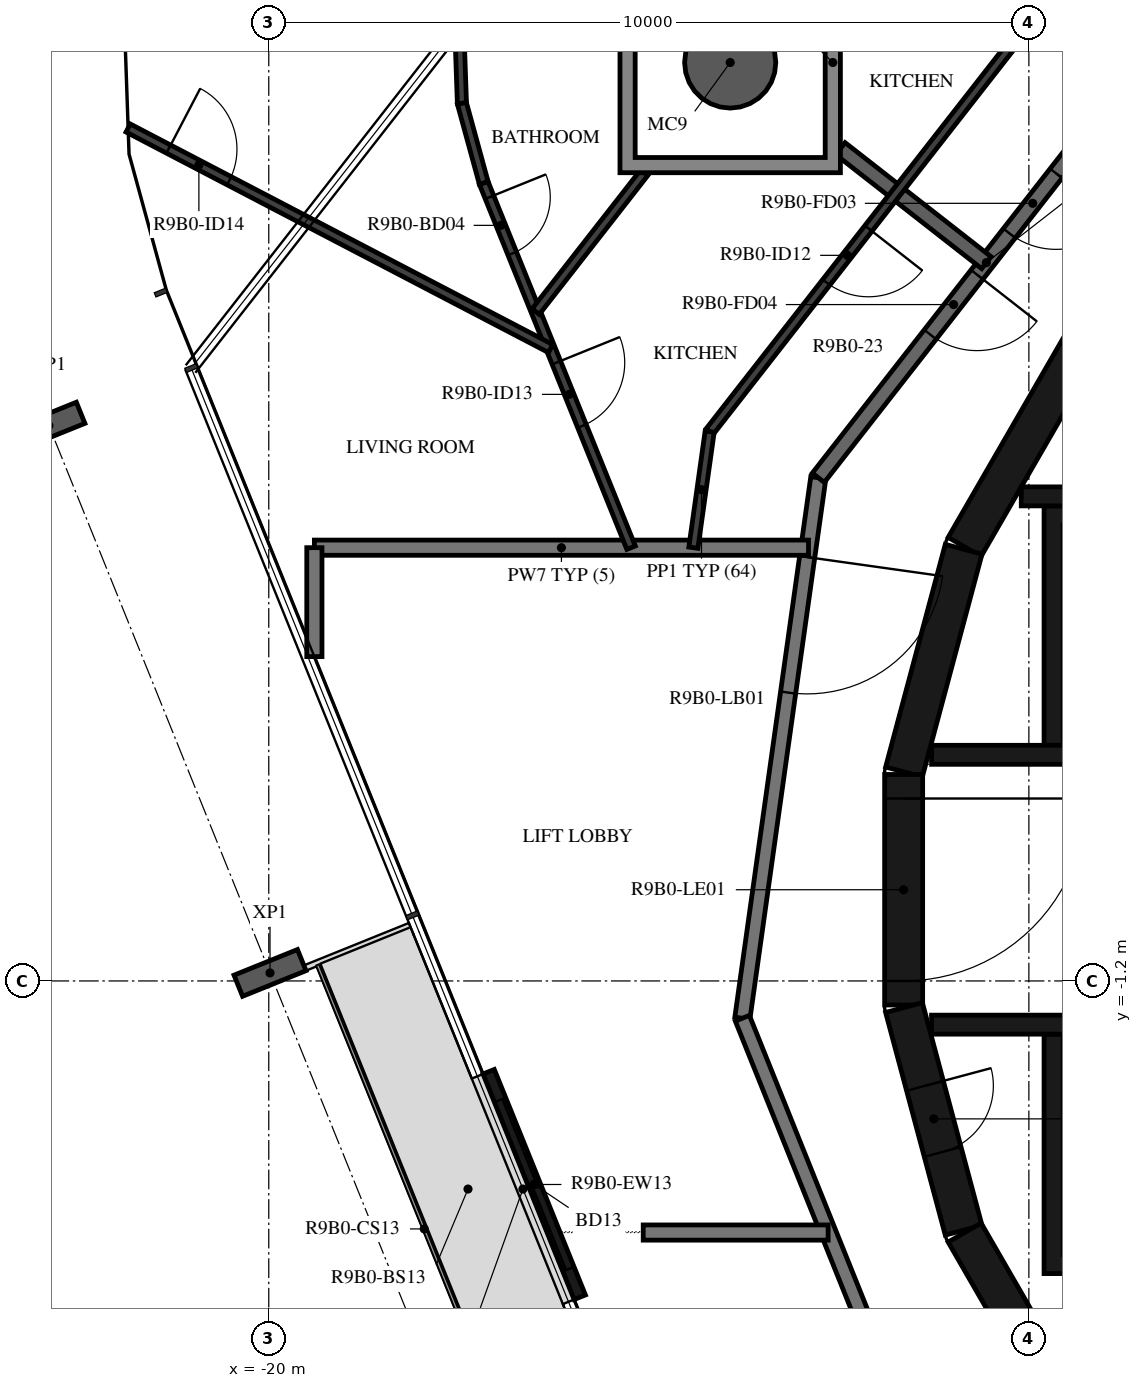
"""IFC4 building model, lengths in metres.
Left out: names, types, materials, properties, quantities, classifications, styles, units other than length and angle.
Written with IfcOpenShell. Run it as: python <this file> out.ifc"""

import sys

from ifc_helpers import new_model, si_unit, direction, frame, frame_2d, origin, origin_2d, place, context, subcontext, project, spatial, polyline, rectangle, hollow_circle, i_section, outline, extrude, element, fill, save


model = new_model("IFC4")
c1 = context("Model", 3, precision=1e-05, world=origin(), true_north=direction((0.0, 1.0)))
c2 = subcontext(c1, "Body", "Model", "MODEL_VIEW")
j1 = project(units=[si_unit("LENGTHUNIT", "METRE"), si_unit("PLANEANGLEUNIT", "RADIAN")], contexts=[c1])
p1 = place(None, origin())
s1 = spatial("IfcSite", under=j1, at=p1, CompositionType="ELEMENT")
p2 = place(p1, origin())
s2 = spatial("IfcBuilding", under=s1, at=p2, CompositionType="ELEMENT")
p3 = place(p2, frame((0.0, 0.0, 347.0)))
s3 = spatial("IfcBuildingStorey", under=s2, at=p3, CompositionType="ELEMENT", Elevation=347.0)
p4 = place(p3, frame((-13.929, 10.883, -0.38), z_axis=(0.0, 0.0, 1.0), x_axis=(1.0, 0.0, 0.0)))
e1 = element("IfcColumn", 1, at=p4, inside=s3, PredefinedType="COLUMN", context=c2, shape_type="SweptSolid", body=[
    extrude(hollow_circle(Radius=0.6, WallThickness=0.03, at=origin_2d()), origin(), (0.0, 0.0, 1.0), 3.5),
])
for number, where, z_axis, x_axis in (
    (2, (-22.893, 6.106, -0.38), (0.0, 0.0, 1.0), (-0.375, 0.927, 0.0)),
    (3, (-19.984, -1.094, -0.38), (0.0, 0.0, 1.0), (-0.375, 0.927, 0.0)),
):
    element("IfcColumn", number, at=place(p3, frame(where, z_axis=z_axis, x_axis=x_axis)), inside=s3, PredefinedType="COLUMN", context=c2, shape_type="SweptSolid", body=[
        extrude(i_section(OverallWidth=0.3, OverallDepth=0.9, WebThickness=0.019, FlangeThickness=0.035, FilletRadius=0.03, at=origin_2d()), origin(), (0.0, 0.0, 1.0), 3.5),
    ])
p5 = place(p3, frame((-17.107, -2.394, 0.0), z_axis=(0.0, 0.0, 1.0), x_axis=(0.374598019739, -0.927187318511, 0.0)))
e4 = element("IfcWall", 4, at=p5, inside=s3, PredefinedType="STANDARD", context=c2, shape_type="SweptSolid", body=[
    extrude(rectangle(XDim=3.2, YDim=0.16, at=frame_2d((1.6, 0.0))), origin(), (0.0, 0.0, 1.0), 3.12),
])
p6 = place(p5, frame((0.4, 0.0, 0.0)))
e5 = element("IfcOpeningElement", 5, at=p6, cuts=e4, PredefinedType="OPENING", context=c2, shape_type="SweptSolid", body=[
    extrude(rectangle(XDim=2.4, YDim=2.4, at=frame_2d((1.2, 1.2))), frame((0.0, 0.09, 0.0), z_axis=(0.0, -1.0, 0.0), x_axis=(1.0, 0.0, 0.0)), (0.0, 0.0, 1.0), 0.18),
])
for number, where, z_axis, x_axis in (
    (6, (-9.329, 7.137, 0.0), (0.0, 0.0, 1.0), (-0.5, -0.866, 0.0)),
    (7, (-10.858, 4.479, 0.0), (0.0, 0.0, 1.0), (-0.259, -0.966, 0.0)),
):
    element("IfcWall", number, at=place(p3, frame(where, z_axis=z_axis, x_axis=x_axis)), inside=s3, PredefinedType="SHEAR", context=c2, shape_type="SweptSolid", body=[
        extrude(rectangle(XDim=3.033, YDim=0.5, at=frame_2d((1.516, 0.0))), origin(), (0.0, 0.0, 1.0), 3.12),
    ])
p7 = place(p3, frame((-11.647, 1.516, 0.0), z_axis=(0.0, 0.0, 1.0), x_axis=(0.0, -1.0, 0.0)))
e8 = element("IfcWall", 8, at=p7, inside=s3, PredefinedType="SHEAR", context=c2, shape_type="SweptSolid", body=[
    extrude(rectangle(XDim=3.033, YDim=0.5, at=frame_2d((1.516, 0.0))), origin(), (0.0, 0.0, 1.0), 3.12),
])
p8 = place(p7, frame((0.316, 0.0, 0.0)))
e9 = element("IfcOpeningElement", 9, at=p8, cuts=e8, PredefinedType="OPENING", context=c2, shape_type="SweptSolid", body=[
    extrude(rectangle(XDim=2.4, YDim=2.1, at=frame_2d((1.2, 1.05))), frame((0.0, 0.26, 0.0), z_axis=(0.0, -1.0, 0.0), x_axis=(1.0, 0.0, 0.0)), (0.0, 0.0, 1.0), 0.52),
])
p9 = place(p3, frame((-11.643, -1.55, 0.0), z_axis=(0.0, 0.0, 1.0), x_axis=(0.258734743916, -0.965948410781, 0.0)))
e10 = element("IfcWall", 10, at=p9, inside=s3, PredefinedType="SHEAR", context=c2, shape_type="SweptSolid", body=[
    extrude(rectangle(XDim=3.033, YDim=0.5, at=frame_2d((1.516, 0.0))), origin(), (0.0, 0.0, 1.0), 3.12),
])
p10 = place(p9, frame((1.066, 0.0, 0.0)))
e11 = element("IfcOpeningElement", 11, at=p10, cuts=e10, PredefinedType="OPENING", context=c2, shape_type="SweptSolid", body=[
    extrude(rectangle(XDim=0.9, YDim=2.1, at=frame_2d((0.45, 1.05))), frame((0.0, 0.26, 0.0), z_axis=(0.0, -1.0, 0.0), x_axis=(1.0, 0.0, 0.0)), (0.0, 0.0, 1.0), 0.52),
])
p11 = place(p3, frame((-10.845, -4.51, 0.0), z_axis=(0.0, 0.0, 1.0), x_axis=(0.500087131594, -0.865975092491, 0.0)))
e12 = element("IfcWall", 12, at=p11, inside=s3, PredefinedType="SHEAR", context=c2, shape_type="SweptSolid", body=[
    extrude(rectangle(XDim=3.033, YDim=0.5, at=frame_2d((1.516, 0.0))), origin(), (0.0, 0.0, 1.0), 3.12),
])
p12 = place(p3, frame((-7.0, 5.175, 0.0), z_axis=(0.0, 0.0, 1.0), x_axis=(-1.0, 0.0, 0.0)))
e13 = element("IfcWall", 13, at=p12, inside=s3, PredefinedType="SHEAR", context=c2, shape_type="SweptSolid", body=[
    extrude(rectangle(XDim=3.1, YDim=0.25, at=frame_2d((1.55, 0.0))), origin(), (0.0, 0.0, 1.0), 3.12),
])
p13 = place(p3, origin())
e14 = element("IfcWall", 14, at=p13, inside=s3, PredefinedType="SHEAR", context=c2, shape_type="SweptSolid", body=[
    extrude(outline(polyline([(-9.8, 1.9), (-9.55, 1.9), (-9.55, 4.8), (-1.2, 4.8), (-1.2, 1.9), (-0.95, 1.9), (-0.95, 4.8), (3.1, 4.8), (3.1, 1.9), (3.35, 1.9), (3.35, 4.8), (5.25, 4.8), (5.25, 1.9), (5.5, 1.9), (5.5, 4.8), (7.4, 4.8), (7.4, 1.9), (7.65, 1.9), (7.65, 4.8), (9.55, 4.8), (9.55, 1.9), (9.8, 1.9), (9.8, 4.8), (9.8, 5.05), (-9.8, 5.05), (-9.8, 4.8), (-9.8, 1.9)])), origin(), (0.0, 0.0, 1.0), 3.12),
])
p14 = place(p3, origin())
e15 = element("IfcWall", 15, at=p14, inside=s3, PredefinedType="SHEAR", context=c2, shape_type="SweptSolid", body=[
    extrude(outline(polyline([(9.8, -5.05), (9.8, -4.8), (9.8, -1.9), (9.55, -1.9), (9.55, -4.8), (7.65, -4.8), (7.65, -1.9), (7.4, -1.9), (7.4, -4.8), (5.5, -4.8), (5.5, -1.9), (5.25, -1.9), (5.25, -4.8), (3.35, -4.8), (3.35, -1.9), (3.1, -1.9), (3.1, -4.8), (1.2, -4.8), (1.2, -1.9), (0.95, -1.9), (0.95, -4.8), (-0.95, -4.8), (-0.95, -1.9), (-1.2, -1.9), (-1.2, -4.8), (-3.1, -4.8), (-3.1, -1.9), (-3.35, -1.9), (-3.35, -4.8), (-5.25, -4.8), (-5.25, -1.9), (-5.5, -1.9), (-5.5, -4.8), (-9.55, -4.8), (-9.55, -1.9), (-9.8, -1.9), (-9.8, -4.8), (-9.8, -5.05), (9.8, -5.05)])), origin(), (0.0, 0.0, 1.0), 3.12),
])
p15 = place(p3, frame((-11.28, 1.775, 0.0), z_axis=(0.0, 0.0, 1.0), x_axis=(1.0, 0.0, 0.0)))
e16 = element("IfcWall", 16, at=p15, inside=s3, PredefinedType="SHEAR", context=c2, shape_type="SweptSolid", body=[
    extrude(rectangle(XDim=14.38, YDim=0.25, at=frame_2d((7.19, 0.0))), origin(), (0.0, 0.0, 1.0), 3.12),
])
p16 = place(p15, frame((5.455, 0.0, 0.0)))
e17 = element("IfcOpeningElement", 17, at=p16, cuts=e16, PredefinedType="OPENING", context=c2, shape_type="SweptSolid", body=[
    extrude(rectangle(XDim=0.9, YDim=2.1, at=frame_2d((0.45, 1.05))), frame((0.0, 0.135, 0.0), z_axis=(0.0, -1.0, 0.0), x_axis=(1.0, 0.0, 0.0)), (0.0, 0.0, 1.0), 0.27),
])
p17 = place(p15, frame((11.905, 0.0, 0.0)))
e18 = element("IfcOpeningElement", 18, at=p17, cuts=e16, PredefinedType="OPENING", context=c2, shape_type="SweptSolid", body=[
    extrude(rectangle(XDim=0.9, YDim=2.1, at=frame_2d((0.45, 1.05))), frame((0.0, 0.135, 0.0), z_axis=(0.0, -1.0, 0.0), x_axis=(1.0, 0.0, 0.0)), (0.0, 0.0, 1.0), 0.27),
])
p18 = place(p3, frame((-11.28, -1.775, 0.0), z_axis=(0.0, 0.0, 1.0), x_axis=(1.0, 0.0, 0.0)))
e19 = element("IfcWall", 19, at=p18, inside=s3, PredefinedType="SHEAR", context=c2, shape_type="SweptSolid", body=[
    extrude(rectangle(XDim=14.38, YDim=0.25, at=frame_2d((7.19, 0.0))), origin(), (0.0, 0.0, 1.0), 3.12),
])
p19 = place(p18, frame((6.43, 0.0, 0.0)))
e20 = element("IfcOpeningElement", 20, at=p19, cuts=e19, PredefinedType="OPENING", context=c2, shape_type="SweptSolid", body=[
    extrude(rectangle(XDim=1.1, YDim=2.1, at=frame_2d((0.55, 1.05))), frame((0.0, 0.135, 0.0), z_axis=(0.0, -1.0, 0.0), x_axis=(1.0, 0.0, 0.0)), (0.0, 0.0, 1.0), 0.27),
])
p20 = place(p18, frame((8.58, 0.0, 0.0)))
e21 = element("IfcOpeningElement", 21, at=p20, cuts=e19, PredefinedType="OPENING", context=c2, shape_type="SweptSolid", body=[
    extrude(rectangle(XDim=1.1, YDim=2.1, at=frame_2d((0.55, 1.05))), frame((0.0, 0.135, 0.0), z_axis=(0.0, -1.0, 0.0), x_axis=(1.0, 0.0, 0.0)), (0.0, 0.0, 1.0), 0.27),
])
p21 = place(p18, frame((10.73, 0.0, 0.0)))
e22 = element("IfcOpeningElement", 22, at=p21, cuts=e19, PredefinedType="OPENING", context=c2, shape_type="SweptSolid", body=[
    extrude(rectangle(XDim=1.1, YDim=2.1, at=frame_2d((0.55, 1.05))), frame((0.0, 0.135, 0.0), z_axis=(0.0, -1.0, 0.0), x_axis=(1.0, 0.0, 0.0)), (0.0, 0.0, 1.0), 0.27),
])
p22 = place(p18, frame((3.305, 0.0, 0.0)))
e23 = element("IfcOpeningElement", 23, at=p22, cuts=e19, PredefinedType="OPENING", context=c2, shape_type="SweptSolid", body=[
    extrude(rectangle(XDim=0.9, YDim=2.1, at=frame_2d((0.45, 1.05))), frame((0.0, 0.135, 0.0), z_axis=(0.0, -1.0, 0.0), x_axis=(1.0, 0.0, 0.0)), (0.0, 0.0, 1.0), 0.27),
])
p23 = place(p18, frame((12.98, 0.0, 0.0)))
e24 = element("IfcOpeningElement", 24, at=p23, cuts=e19, PredefinedType="OPENING", context=c2, shape_type="SweptSolid", body=[
    extrude(rectangle(XDim=0.9, YDim=2.1, at=frame_2d((0.45, 1.05))), frame((0.0, 0.135, 0.0), z_axis=(0.0, -1.0, 0.0), x_axis=(1.0, 0.0, 0.0)), (0.0, 0.0, 1.0), 0.27),
])
p24 = place(p3, frame((-12.77, 5.42, 0.0), z_axis=(0.0, 0.0, 1.0), x_axis=(-0.139155334385, -0.990270565508, 0.0)))
e25 = element("IfcWall", 25, at=p24, inside=s3, PredefinedType="STANDARD", context=c2, shape_type="SweptSolid", body=[
    extrude(rectangle(XDim=7.181, YDim=0.2, at=frame_2d((3.59, 0.0))), origin(), (0.0, 0.0, 1.0), 3.12),
])
p25 = place(p24, frame((1.055, 0.0, 0.0)))
e26 = element("IfcOpeningElement", 26, at=p25, cuts=e25, PredefinedType="OPENING", context=c2, shape_type="SweptSolid", body=[
    extrude(rectangle(XDim=1.8, YDim=2.1, at=frame_2d((0.9, 1.05))), frame((0.0, 0.11, 0.0), z_axis=(0.0, -1.0, 0.0), x_axis=(1.0, 0.0, 0.0)), (0.0, 0.0, 1.0), 0.22),
])
p26 = place(p3, frame((-13.769, -1.691, 0.0), z_axis=(0.0, 0.0, 1.0), x_axis=(0.372720094028, -0.927943819155, 0.0)))
e27 = element("IfcWall", 27, at=p26, inside=s3, PredefinedType="STANDARD", context=c2, shape_type="SweptSolid", body=[
    extrude(rectangle(XDim=4.875, YDim=0.2, at=frame_2d((2.438, 0.0))), origin(), (0.0, 0.0, 1.0), 3.12),
])
p27 = place(p3, frame((-8.349, 11.079, 0.0), z_axis=(0.0, 0.0, 1.0), x_axis=(-0.615669112324, -0.78800478687, 0.0)))
e28 = element("IfcWall", 28, at=p27, inside=s3, PredefinedType="STANDARD", context=c2, shape_type="SweptSolid", body=[
    extrude(rectangle(XDim=7.181, YDim=0.2, at=frame_2d((3.591, 0.0))), origin(), (0.0, 0.0, 1.0), 3.12),
])
p28 = place(p27, frame((2.1, 0.0, 0.0)))
e29 = element("IfcOpeningElement", 29, at=p28, cuts=e28, PredefinedType="OPENING", context=c2, shape_type="SweptSolid", body=[
    extrude(rectangle(XDim=1.0, YDim=2.1, at=frame_2d((0.5, 1.05))), frame((0.0, 0.11, 0.0), z_axis=(0.0, -1.0, 0.0), x_axis=(1.0, 0.0, 0.0)), (0.0, 0.0, 1.0), 0.22),
])
p29 = place(p27, frame((3.79, 0.0, 0.0)))
e30 = element("IfcOpeningElement", 30, at=p29, cuts=e28, PredefinedType="OPENING", context=c2, shape_type="SweptSolid", body=[
    extrude(rectangle(XDim=1.0, YDim=2.1, at=frame_2d((0.5, 1.05))), frame((0.0, 0.11, 0.0), z_axis=(0.0, -1.0, 0.0), x_axis=(1.0, 0.0, 0.0)), (0.0, 0.0, 1.0), 0.22),
])
p30 = place(p3, frame((-12.899, 4.5, 0.0), z_axis=(0.0, 0.0, 1.0), x_axis=(-1.0, 0.0, 0.0)))
e31 = element("IfcWall", 31, at=p30, inside=s3, PredefinedType="STANDARD", context=c2, shape_type="SweptSolid", body=[
    extrude(rectangle(XDim=6.5, YDim=0.2, at=frame_2d((3.25, 0.0))), origin(), (0.0, 0.0, 1.0), 3.12),
])
p31 = place(p3, frame((-19.4, 4.5, 0.0), z_axis=(0.0, 0.0, 1.0), x_axis=(0.0, -1.0, 0.0)))
e32 = element("IfcWall", 32, at=p31, inside=s3, PredefinedType="STANDARD", context=c2, shape_type="SweptSolid", body=[
    extrude(rectangle(XDim=1.433, YDim=0.2, at=frame_2d((0.716, 0.0))), origin(), (0.0, 0.0, 1.0), 3.12),
])
p32 = place(p3, frame((-15.074, -4.51, 0.0), z_axis=(0.0, 0.0, 1.0), x_axis=(1.0, 0.0, 0.0)))
e33 = element("IfcWall", 33, at=p32, inside=s3, PredefinedType="STANDARD", context=c2, shape_type="SweptSolid", body=[
    extrude(rectangle(XDim=2.433, YDim=0.2, at=frame_2d((1.216, 0.0))), origin(), (0.0, 0.0, 1.0), 3.12),
])
p33 = place(p3, frame((-12.479, 9.75, 0.0), z_axis=(0.0, 0.0, 1.0), x_axis=(0.788050197026, -0.615610986717, 0.0)))
e34 = element("IfcWall", 34, at=p33, inside=s3, PredefinedType="STANDARD", context=c2, shape_type="SweptSolid", body=[
    extrude(rectangle(XDim=2.437, YDim=0.2, at=frame_2d((1.218, 0.0))), origin(), (0.0, 0.0, 1.0), 3.12),
])
p34 = place(p3, frame((-9.283, 12.319, 0.0), z_axis=(0.0, 0.0, 1.0), x_axis=(-0.61567489546, -0.788000268464, 0.0)))
e35 = element("IfcWall", 35, at=p34, inside=s3, PredefinedType="PARTITIONING", context=c2, shape_type="SweptSolid", body=[
    extrude(rectangle(XDim=7.985, YDim=0.12, at=frame_2d((3.992, 0.0))), origin(), (0.0, 0.0, 1.0), 3.12),
])
p35 = place(p34, frame((0.2, 0.0, 0.0)))
e36 = element("IfcOpeningElement", 36, at=p35, cuts=e35, PredefinedType="OPENING", context=c2, shape_type="SweptSolid", body=[
    extrude(rectangle(XDim=0.9, YDim=2.1, at=frame_2d((0.45, 1.05))), frame((0.0, 0.07, 0.0), z_axis=(0.0, -1.0, 0.0), x_axis=(1.0, 0.0, 0.0)), (0.0, 0.0, 1.0), 0.14),
])
p36 = place(p34, frame((4.592, 0.0, 0.0)))
e37 = element("IfcOpeningElement", 37, at=p36, cuts=e35, PredefinedType="OPENING", context=c2, shape_type="SweptSolid", body=[
    extrude(rectangle(XDim=0.9, YDim=2.1, at=frame_2d((0.45, 1.05))), frame((0.0, 0.07, 0.0), z_axis=(0.0, -1.0, 0.0), x_axis=(1.0, 0.0, 0.0)), (0.0, 0.0, 1.0), 0.14),
])
p37 = place(p3, frame((-14.199, 6.027, 0.0), z_axis=(0.0, 0.0, 1.0), x_axis=(-0.139138413837, -0.990272943079, 0.0)))
e38 = element("IfcWall", 38, at=p37, inside=s3, PredefinedType="PARTITIONING", context=c2, shape_type="SweptSolid", body=[
    extrude(rectangle(XDim=1.542, YDim=0.12, at=frame_2d((0.771, 0.0))), origin(), (0.0, 0.0, 1.0), 3.12),
])
p38 = place(p3, frame((-17.488, 11.173, 0.0), z_axis=(0.0, 0.0, 1.0), x_axis=(0.03505065691, -0.999385536943, 0.0)))
e39 = element("IfcWall", 39, at=p38, inside=s3, PredefinedType="PARTITIONING", context=c2, shape_type="SweptSolid", body=[
    extrude(rectangle(XDim=0.829, YDim=0.12, at=frame_2d((0.415, 0.0))), origin(), (0.0, 0.0, 1.0), 3.12),
])
p39 = place(p3, frame((-17.459, 10.345, 0.0), z_axis=(0.0, 0.0, 1.0), x_axis=(0.264409755069, -0.964410432038, 0.0)))
e40 = element("IfcWall", 40, at=p39, inside=s3, PredefinedType="PARTITIONING", context=c2, shape_type="SweptSolid", body=[
    extrude(rectangle(XDim=1.087, YDim=0.12, at=frame_2d((0.543, 0.0))), origin(), (0.0, 0.0, 1.0), 3.12),
])
p40 = place(p3, frame((-17.171, 9.297, 0.0), z_axis=(0.0, 0.0, 1.0), x_axis=(0.374594127493, -0.927188891029, 0.0)))
e41 = element("IfcWall", 41, at=p40, inside=s3, PredefinedType="PARTITIONING", context=c2, shape_type="SweptSolid", body=[
    extrude(rectangle(XDim=5.174, YDim=0.12, at=frame_2d((2.587, 0.0))), origin(), (0.0, 0.0, 1.0), 3.12),
])
p41 = place(p40, frame((2.548, 0.0, 0.0)))
e42 = element("IfcOpeningElement", 42, at=p41, cuts=e41, PredefinedType="OPENING", context=c2, shape_type="SweptSolid", body=[
    extrude(rectangle(XDim=0.9, YDim=2.1, at=frame_2d((0.45, 1.05))), frame((0.0, 0.07, 0.0), z_axis=(0.0, -1.0, 0.0), x_axis=(1.0, 0.0, 0.0)), (0.0, 0.0, 1.0), 0.14),
])
p42 = place(p40, frame((0.2, 0.0, 0.0)))
e43 = element("IfcOpeningElement", 43, at=p42, cuts=e41, PredefinedType="OPENING", context=c2, shape_type="SweptSolid", body=[
    extrude(rectangle(XDim=0.8, YDim=2.1, at=frame_2d((0.4, 1.05))), frame((0.0, 0.07, 0.0), z_axis=(0.0, -1.0, 0.0), x_axis=(1.0, 0.0, 0.0)), (0.0, 0.0, 1.0), 0.14),
])
p43 = place(p3, frame((-16.488, 7.606, 0.0), z_axis=(0.0, 0.0, 1.0), x_axis=(0.615637911154, 0.788029163388, 0.0)))
e44 = element("IfcWall", 44, at=p43, inside=s3, PredefinedType="PARTITIONING", context=c2, shape_type="SweptSolid", body=[
    extrude(rectangle(XDim=2.318, YDim=0.12, at=frame_2d((1.159, 0.0))), origin(), (0.0, 0.0, 1.0), 3.12),
])
p44 = place(p3, frame((-21.85, 10.021, 0.0), z_axis=(0.0, 0.0, 1.0), x_axis=(0.886479988406, -0.462766928546, 0.0)))
e45 = element("IfcWall", 45, at=p44, inside=s3, PredefinedType="PARTITIONING", context=c2, shape_type="SweptSolid", body=[
    extrude(rectangle(XDim=6.27, YDim=0.12, at=frame_2d((3.135, 0.0))), origin(), (0.0, 0.0, 1.0), 3.12),
])
p45 = place(p44, frame((0.6, 0.0, 0.0)))
e46 = element("IfcOpeningElement", 46, at=p45, cuts=e45, PredefinedType="OPENING", context=c2, shape_type="SweptSolid", body=[
    extrude(rectangle(XDim=0.9, YDim=2.1, at=frame_2d((0.45, 1.05))), frame((0.0, 0.07, 0.0), z_axis=(0.0, -1.0, 0.0), x_axis=(1.0, 0.0, 0.0)), (0.0, 0.0, 1.0), 0.14),
])
p46 = place(p3, origin())
e47 = element("IfcWall", 47, at=p46, inside=s3, PredefinedType="STANDARD", context=c2, shape_type="SweptSolid", body=[
    extrude(outline(polyline([(-12.479, 12.333), (-12.479, 9.433), (-15.379, 9.433), (-15.379, 12.333), (-12.479, 12.333)]), holes=[polyline([(-15.179, 9.633), (-12.679, 9.633), (-12.679, 12.133), (-15.179, 12.133), (-15.179, 9.633)])]), origin(), (0.0, 0.0, 1.0), 3.12),
])
p47 = place(p6, origin())
e48 = element("IfcDoor", 48, at=p47, inside=s3, OperationType="DOUBLE_DOOR_SLIDING", PredefinedType="DOOR", context=c2, shape_type="SweptSolid", body=[
    extrude(rectangle(XDim=2.4, YDim=2.4, at=frame_2d((1.2, 1.2))), frame((0.0, 0.025, 0.0), z_axis=(0.0, -1.0, 0.0), x_axis=(1.0, 0.0, 0.0)), (0.0, 0.0, 1.0), 0.05),
])
fill(e5, e48)
p48 = place(p8, origin())
e49 = element("IfcDoor", 49, at=p48, inside=s3, OperationType="DOUBLE_DOOR_SINGLE_SWING", PredefinedType="DOOR", context=c2, shape_type="SweptSolid", body=[
    extrude(rectangle(XDim=2.4, YDim=2.1, at=frame_2d((1.2, 1.05))), frame((0.0, 0.025, 0.0), z_axis=(0.0, -1.0, 0.0), x_axis=(1.0, 0.0, 0.0)), (0.0, 0.0, 1.0), 0.05),
])
fill(e9, e49)
p49 = place(p10, origin())
e50 = element("IfcDoor", 50, at=p49, inside=s3, OperationType="SINGLE_SWING_RIGHT", PredefinedType="DOOR", context=c2, shape_type="SweptSolid", body=[
    extrude(rectangle(XDim=0.9, YDim=2.1, at=frame_2d((0.45, 1.05))), frame((0.0, 0.025, 0.0), z_axis=(0.0, -1.0, 0.0), x_axis=(1.0, 0.0, 0.0)), (0.0, 0.0, 1.0), 0.05),
])
fill(e11, e50)
p50 = place(p28, origin())
e51 = element("IfcDoor", 51, at=p50, inside=s3, OperationType="SINGLE_SWING_RIGHT", PredefinedType="DOOR", context=c2, shape_type="SweptSolid", body=[
    extrude(rectangle(XDim=1.0, YDim=2.1, at=frame_2d((0.5, 1.05))), frame((0.0, 0.025, 0.0), z_axis=(0.0, -1.0, 0.0), x_axis=(1.0, 0.0, 0.0)), (0.0, 0.0, 1.0), 0.05),
])
fill(e29, e51)
p51 = place(p29, origin())
e52 = element("IfcDoor", 52, at=p51, inside=s3, OperationType="SINGLE_SWING_LEFT", PredefinedType="DOOR", context=c2, shape_type="SweptSolid", body=[
    extrude(rectangle(XDim=1.0, YDim=2.1, at=frame_2d((0.5, 1.05))), frame((0.0, 0.025, 0.0), z_axis=(0.0, -1.0, 0.0), x_axis=(1.0, 0.0, 0.0)), (0.0, 0.0, 1.0), 0.05),
])
fill(e30, e52)
p52 = place(p36, origin())
e53 = element("IfcDoor", 53, at=p52, inside=s3, OperationType="SINGLE_SWING_LEFT", PredefinedType="DOOR", context=c2, shape_type="SweptSolid", body=[
    extrude(rectangle(XDim=0.9, YDim=2.1, at=frame_2d((0.45, 1.05))), frame((0.0, 0.025, 0.0), z_axis=(0.0, -1.0, 0.0), x_axis=(1.0, 0.0, 0.0)), (0.0, 0.0, 1.0), 0.05),
])
fill(e37, e53)
p53 = place(p41, origin())
e54 = element("IfcDoor", 54, at=p53, inside=s3, OperationType="SINGLE_SWING_LEFT", PredefinedType="DOOR", context=c2, shape_type="SweptSolid", body=[
    extrude(rectangle(XDim=0.9, YDim=2.1, at=frame_2d((0.45, 1.05))), frame((0.0, 0.025, 0.0), z_axis=(0.0, -1.0, 0.0), x_axis=(1.0, 0.0, 0.0)), (0.0, 0.0, 1.0), 0.05),
])
fill(e42, e54)
p54 = place(p45, origin())
e55 = element("IfcDoor", 55, at=p54, inside=s3, OperationType="SINGLE_SWING_LEFT", PredefinedType="DOOR", context=c2, shape_type="SweptSolid", body=[
    extrude(rectangle(XDim=0.9, YDim=2.1, at=frame_2d((0.45, 1.05))), frame((0.0, 0.025, 0.0), z_axis=(0.0, -1.0, 0.0), x_axis=(1.0, 0.0, 0.0)), (0.0, 0.0, 1.0), 0.05),
])
fill(e46, e55)
p55 = place(p42, origin())
e56 = element("IfcDoor", 56, at=p55, inside=s3, OperationType="SINGLE_SWING_RIGHT", PredefinedType="DOOR", context=c2, shape_type="SweptSolid", body=[
    extrude(rectangle(XDim=0.8, YDim=2.1, at=frame_2d((0.4, 1.05))), frame((0.0, 0.025, 0.0), z_axis=(0.0, -1.0, 0.0), x_axis=(1.0, 0.0, 0.0)), (0.0, 0.0, 1.0), 0.05),
])
fill(e43, e56)
p56 = place(p25, origin())
e57 = element("IfcDoor", 57, at=p56, inside=s3, OperationType="DOUBLE_DOOR_SINGLE_SWING", PredefinedType="DOOR", context=c2, shape_type="SweptSolid", body=[
    extrude(rectangle(XDim=1.8, YDim=2.1, at=frame_2d((0.9, 1.05))), frame((0.0, 0.025, 0.0), z_axis=(0.0, -1.0, 0.0), x_axis=(1.0, 0.0, 0.0)), (0.0, 0.0, 1.0), 0.05),
])
fill(e26, e57)
save(model, sys.argv[1])
